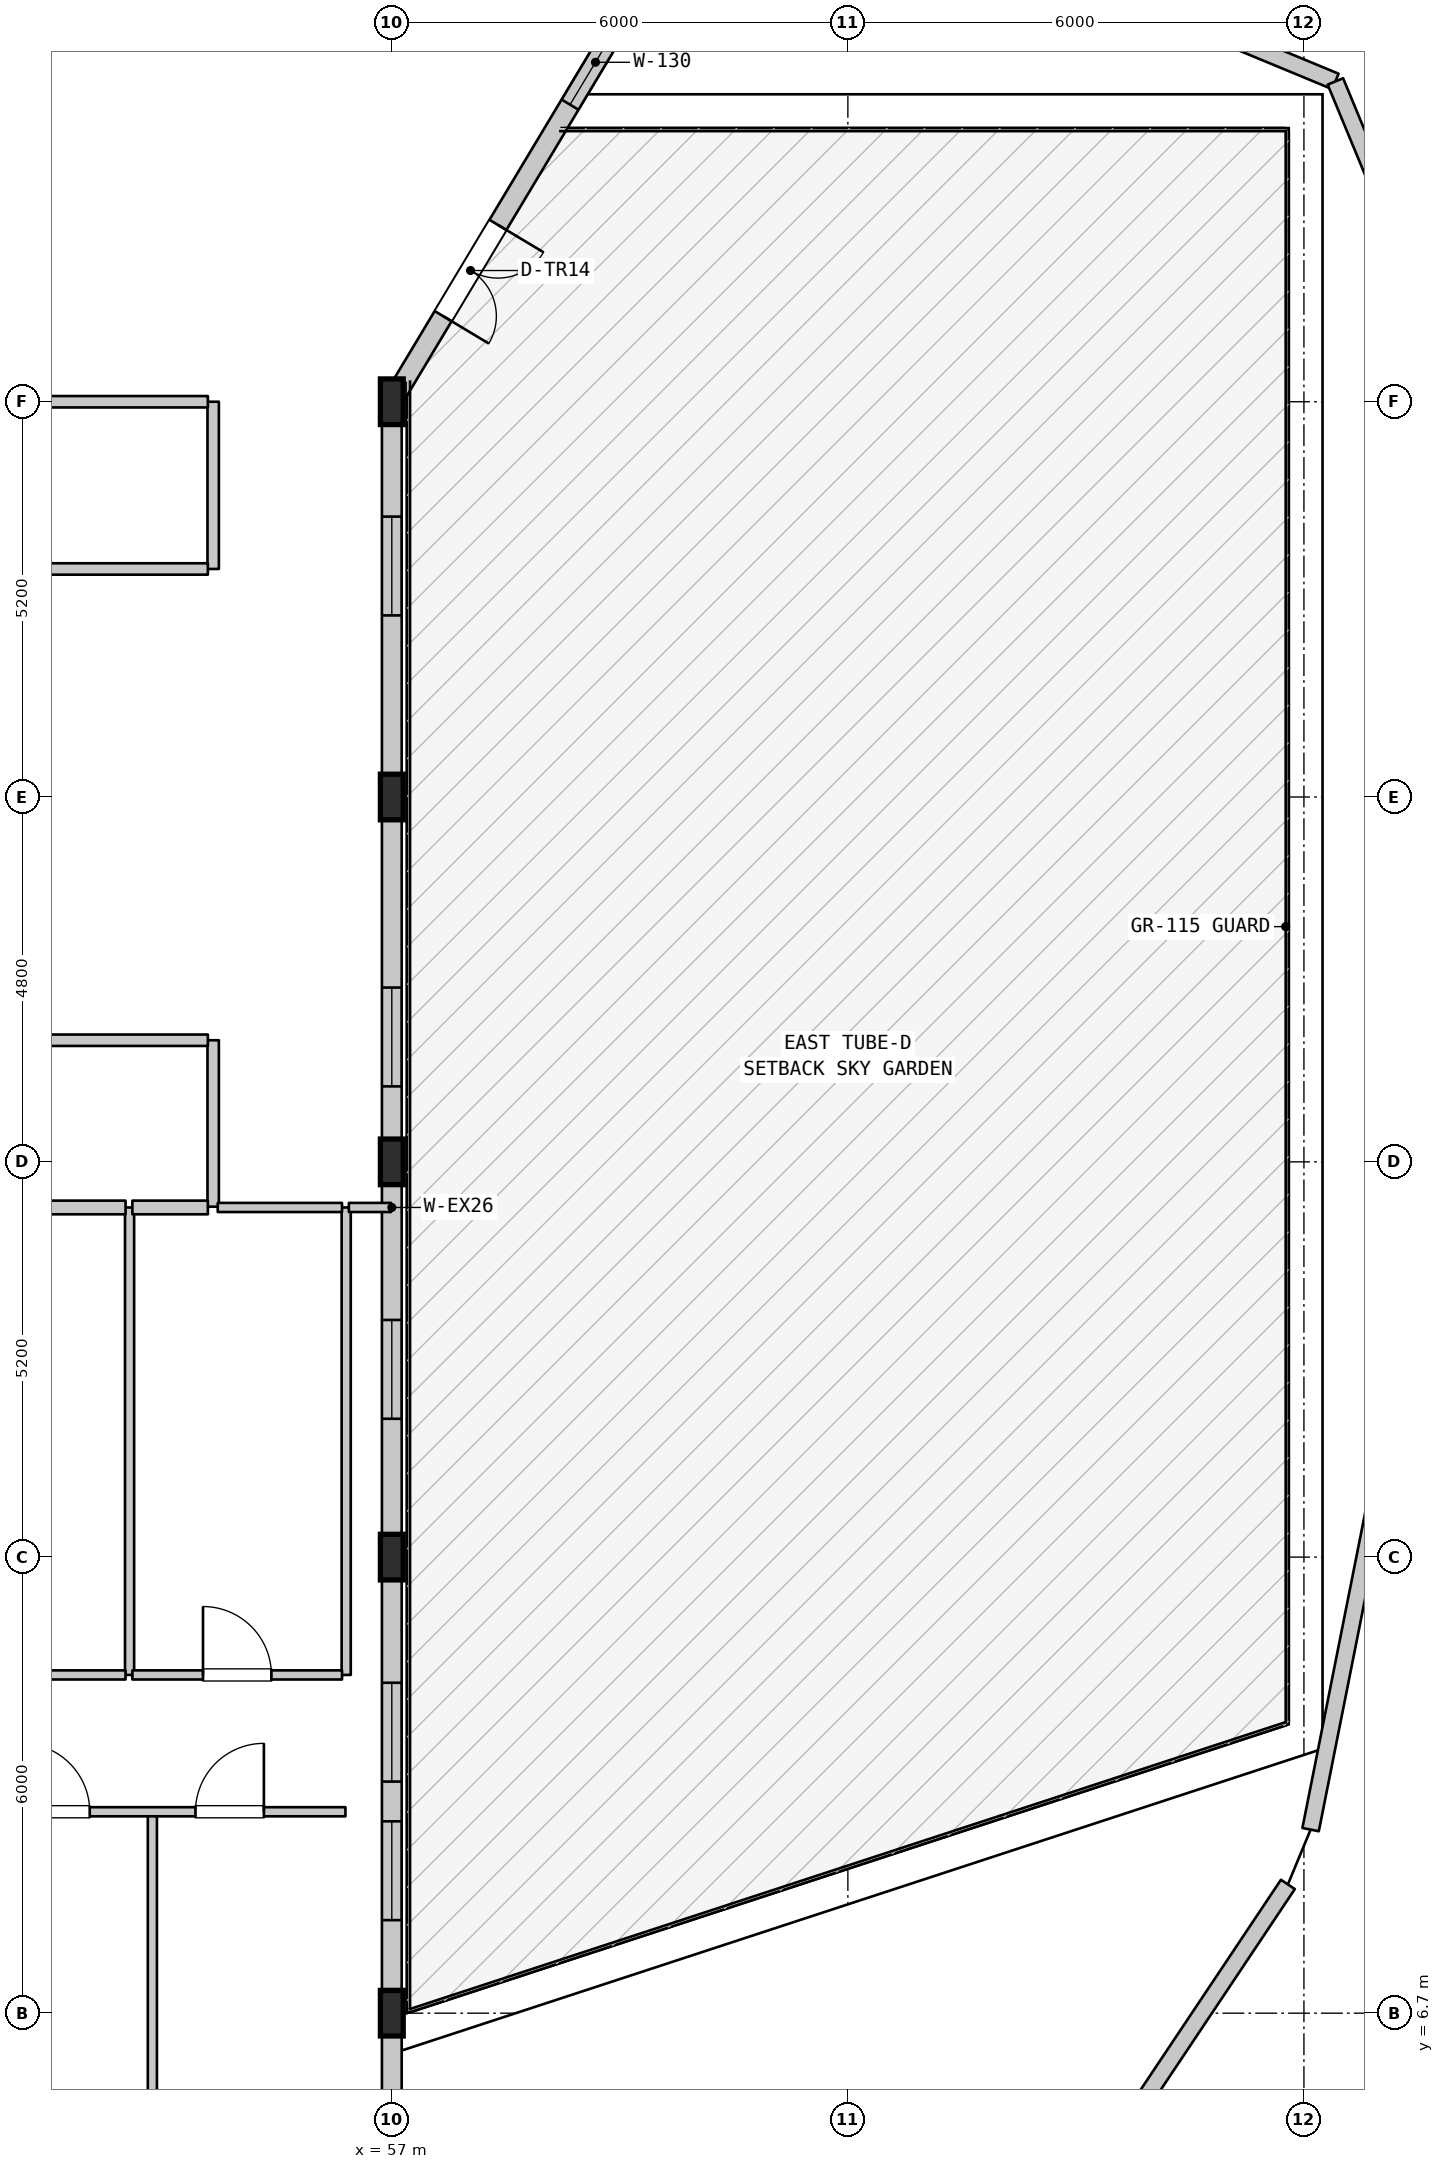
"""IFC4 building model, lengths in metres.
Left out: names, types, materials, properties, quantities, classifications, styles, units other than length and angle.
Written with IfcOpenShell. Run it as: python <this file> out.ifc"""

import sys

from ifc_helpers import new_model, si_unit, direction, frame, frame_2d, origin, origin_2d, place, context, subcontext, project, spatial, rectangle, i_section, extrude, element, fill, save


model = new_model("IFC4")
c1 = context("Model", 3, precision=1e-05, world=origin(), true_north=direction((0.0, 1.0)))
c2 = subcontext(c1, "Body", "Model", "MODEL_VIEW")
j1 = project(units=[si_unit("LENGTHUNIT", "METRE"), si_unit("PLANEANGLEUNIT", "RADIAN")], contexts=[c1])
p1 = place(None, origin())
s1 = spatial("IfcSite", under=j1, at=p1, CompositionType="ELEMENT")
p2 = place(p1, origin())
s2 = spatial("IfcBuilding", under=s1, at=p2, CompositionType="ELEMENT")
p3 = place(p2, frame((0.0, 0.0, 86.4)))
s3 = spatial("IfcBuildingStorey", under=s2, at=p3, CompositionType="ELEMENT", Elevation=86.4)
for number, where, z_axis, x_axis in (
    (1, (57.0, 6.7, 0.0), (0.0, 0.0, 1.0), (1.0, 0.0, 0.0)),
    (2, (57.0, 12.7, 0.0), (0.0, 0.0, 1.0), (1.0, 0.0, 0.0)),
    (3, (57.0, 17.9, 0.0), (0.0, 0.0, 1.0), (1.0, 0.0, 0.0)),
    (4, (57.0, 22.7, 0.0), (0.0, 0.0, 1.0), (1.0, 0.0, 0.0)),
    (5, (57.0, 27.9, 0.0), (0.0, 0.0, 1.0), (1.0, 0.0, 0.0)),
):
    element("IfcColumn", number, at=place(p3, frame(where, z_axis=z_axis, x_axis=x_axis)), inside=s3, PredefinedType="COLUMN", context=c2, shape_type="SweptSolid", body=[
        extrude(i_section(OverallWidth=0.3, OverallDepth=0.6, WebThickness=0.015, FlangeThickness=0.03, FilletRadius=0.027, at=origin_2d()), origin(), (0.0, 0.0, 1.0), 4.5),
    ])
p4 = place(p3, frame((62.308, 36.747, 0.0), z_axis=(0.0, 0.0, 1.0), x_axis=(-0.514481835924, -0.857501277261, 0.0)))
e6 = element("IfcWall", 6, at=p4, inside=s3, PredefinedType="STANDARD", context=c2, shape_type="SweptSolid", body=[
    extrude(rectangle(XDim=10.317, YDim=0.26, at=frame_2d((5.159, 0.0))), origin(), (0.0, 0.0, 1.0), 4.185),
])
p5 = place(p4, frame((7.604, 0.0, 0.0)))
e7 = element("IfcOpeningElement", 7, at=p5, cuts=e6, PredefinedType="OPENING", context=c2, shape_type="SweptSolid", body=[
    extrude(rectangle(XDim=1.4, YDim=2.2, at=frame_2d((0.7, 1.1))), frame((0.0, 0.14, 0.0), z_axis=(0.0, -1.0, 0.0), x_axis=(1.0, 0.0, 0.0)), (0.0, 0.0, 1.0), 0.28),
])
p6 = place(p4, frame((1.286, 0.0, 0.9)))
e8 = element("IfcOpeningElement", 8, at=p6, cuts=e6, PredefinedType="OPENING", context=c2, shape_type="SweptSolid", body=[
    extrude(rectangle(XDim=1.4, YDim=1.85, at=frame_2d((0.7, 0.925))), frame((0.0, 0.14, 0.0), z_axis=(0.0, -1.0, 0.0), x_axis=(1.0, 0.0, 0.0)), (0.0, 0.0, 1.0), 0.28),
])
p7 = place(p4, frame((4.459, 0.0, 0.9)))
e9 = element("IfcOpeningElement", 9, at=p7, cuts=e6, PredefinedType="OPENING", context=c2, shape_type="SweptSolid", body=[
    extrude(rectangle(XDim=1.3, YDim=1.9, at=frame_2d((0.65, 0.95))), frame((0.0, 0.14, 0.0), z_axis=(0.0, -1.0, 0.0), x_axis=(1.0, 0.0, 0.0)), (0.0, 0.0, 1.0), 0.28),
])
p8 = place(p3, frame((57.0, 27.9, 0.0), z_axis=(0.0, 0.0, 1.0), x_axis=(0.0, -1.0, 0.0)))
e10 = element("IfcWall", 10, at=p8, inside=s3, PredefinedType="STANDARD", context=c2, shape_type="SweptSolid", body=[
    extrude(rectangle(XDim=21.2, YDim=0.26, at=frame_2d((10.6, 0.0))), origin(), (0.0, 0.0, 1.0), 3.735),
])
p9 = place(p8, frame((1.511, 0.0, 0.85)))
e11 = element("IfcOpeningElement", 11, at=p9, cuts=e10, PredefinedType="OPENING", context=c2, shape_type="SweptSolid", body=[
    extrude(rectangle(XDim=1.3, YDim=1.9, at=frame_2d((0.65, 0.95))), frame((0.0, 0.14, 0.0), z_axis=(0.0, -1.0, 0.0), x_axis=(1.0, 0.0, 0.0)), (0.0, 0.0, 1.0), 0.28),
])
p10 = place(p8, frame((7.707, 0.0, 0.85)))
e12 = element("IfcOpeningElement", 12, at=p10, cuts=e10, PredefinedType="OPENING", context=c2, shape_type="SweptSolid", body=[
    extrude(rectangle(XDim=1.3, YDim=1.9, at=frame_2d((0.65, 0.95))), frame((0.0, 0.14, 0.0), z_axis=(0.0, -1.0, 0.0), x_axis=(1.0, 0.0, 0.0)), (0.0, 0.0, 1.0), 0.28),
])
p11 = place(p8, frame((12.08, 0.0, 0.85)))
e13 = element("IfcOpeningElement", 13, at=p11, cuts=e10, PredefinedType="OPENING", context=c2, shape_type="SweptSolid", body=[
    extrude(rectangle(XDim=1.3, YDim=1.9, at=frame_2d((0.65, 0.95))), frame((0.0, 0.14, 0.0), z_axis=(0.0, -1.0, 0.0), x_axis=(1.0, 0.0, 0.0)), (0.0, 0.0, 1.0), 0.28),
])
p12 = place(p8, frame((16.853, 0.0, 0.85)))
e14 = element("IfcOpeningElement", 14, at=p12, cuts=e10, PredefinedType="OPENING", context=c2, shape_type="SweptSolid", body=[
    extrude(rectangle(XDim=1.3, YDim=1.9, at=frame_2d((0.65, 0.95))), frame((0.0, 0.14, 0.0), z_axis=(0.0, -1.0, 0.0), x_axis=(1.0, 0.0, 0.0)), (0.0, 0.0, 1.0), 0.28),
])
p13 = place(p8, frame((18.676, 0.0, 0.85)))
e15 = element("IfcOpeningElement", 15, at=p13, cuts=e10, PredefinedType="OPENING", context=c2, shape_type="SweptSolid", body=[
    extrude(rectangle(XDim=1.3, YDim=1.9, at=frame_2d((0.65, 0.95))), frame((0.0, 0.14, 0.0), z_axis=(0.0, -1.0, 0.0), x_axis=(1.0, 0.0, 0.0)), (0.0, 0.0, 1.0), 0.28),
])
for number, where, z_axis, x_axis in (
    (16, (68.0, 32.7, 0.0), (0.0, 0.0, 1.0), (0.924, -0.383, 0.0)),
    (17, (69.414, 32.114, 0.0), (0.0, 0.0, 1.0), (0.383, -0.924, 0.0)),
):
    element("IfcWall", number, at=place(p3, frame(where, z_axis=z_axis, x_axis=x_axis)), inside=s3, PredefinedType="PARAPET", context=c2, shape_type="SweptSolid", body=[
        extrude(rectangle(XDim=1.531, YDim=0.22, at=frame_2d((0.765, 0.0))), origin(), (0.0, 0.0, 1.0), 0.55),
    ])
p14 = place(p3, frame((69.962, 13.507, 0.0), z_axis=(0.0, 0.0, 1.0), x_axis=(-0.195172473082, -0.980768935963, 0.0)))
e18 = element("IfcWall", 18, at=p14, inside=s3, PredefinedType="PARAPET", context=c2, shape_type="SweptSolid", body=[
    extrude(rectangle(XDim=4.478, YDim=0.22, at=frame_2d((2.239, 0.0))), origin(), (0.0, 0.0, 1.0), 0.55),
])
p15 = place(p3, frame((68.789, 8.394, 0.0), z_axis=(0.0, 0.0, 1.0), x_axis=(-0.555543000532, -0.831487807824, 0.0)))
e19 = element("IfcWall", 19, at=p15, inside=s3, PredefinedType="PARAPET", context=c2, shape_type="SweptSolid", body=[
    extrude(rectangle(XDim=4.277, YDim=0.22, at=frame_2d((2.138, 0.0))), origin(), (0.0, 0.0, 1.0), 0.55),
])
p16 = place(p3, frame((53.55, 11.15, 0.0), z_axis=(0.0, 0.0, 1.0), x_axis=(0.0, 1.0, 0.0)))
e20 = element("IfcWall", 20, at=p16, inside=s3, PredefinedType="PARTITIONING", context=c2, shape_type="SweptSolid", body=[
    extrude(rectangle(XDim=6.15, YDim=0.12, at=frame_2d((3.075, 0.0))), origin(), (0.0, 0.0, 1.0), 4.185),
])
p17 = place(p3, frame((53.85, 0.71, 0.0), z_axis=(0.0, 0.0, 1.0), x_axis=(0.0, 1.0, 0.0)))
e21 = element("IfcWall", 21, at=p17, inside=s3, PredefinedType="PARTITIONING", context=c2, shape_type="SweptSolid", body=[
    extrude(rectangle(XDim=8.64, YDim=0.12, at=frame_2d((4.32, 0.0))), origin(), (0.0, 0.0, 1.0), 4.185),
])
p18 = place(p3, frame((54.65, 17.31, 0.0), z_axis=(0.0, 0.0, 1.0), x_axis=(0.0, 1.0, 0.0)))
e22 = element("IfcWall", 22, at=p18, inside=s3, PredefinedType="STANDARD", context=c2, shape_type="SweptSolid", body=[
    extrude(rectangle(XDim=2.19, YDim=0.15, at=frame_2d((1.095, 0.0))), origin(), (0.0, 0.0, 1.0), 4.185),
])
p19 = place(p3, frame((54.65, 25.7, 0.0), z_axis=(0.0, 0.0, 1.0), x_axis=(0.0, 1.0, 0.0)))
e23 = element("IfcWall", 23, at=p19, inside=s3, PredefinedType="STANDARD", context=c2, shape_type="SweptSolid", body=[
    extrude(rectangle(XDim=2.2, YDim=0.15, at=frame_2d((1.1, 0.0))), origin(), (0.0, 0.0, 1.0), 4.185),
])
p20 = place(p3, frame((56.4, 11.15, 0.0), z_axis=(0.0, 0.0, 1.0), x_axis=(0.0, 1.0, 0.0)))
e24 = element("IfcWall", 24, at=p20, inside=s3, PredefinedType="PARTITIONING", context=c2, shape_type="SweptSolid", body=[
    extrude(rectangle(XDim=6.15, YDim=0.12, at=frame_2d((3.075, 0.0))), origin(), (0.0, 0.0, 1.0), 4.185),
])
p21 = place(p3, frame((46.265, 9.35, 0.0), z_axis=(0.0, 0.0, 1.0), x_axis=(1.0, 0.0, 0.0)))
e25 = element("IfcWall", 25, at=p21, inside=s3, PredefinedType="PARTITIONING", context=c2, shape_type="SweptSolid", body=[
    extrude(rectangle(XDim=10.125, YDim=0.12, at=frame_2d((5.062, 0.0))), origin(), (0.0, 0.0, 1.0), 4.185),
])
p22 = place(p21, frame((0.875, 0.0, 0.0)))
e26 = element("IfcOpeningElement", 26, at=p22, cuts=e25, PredefinedType="OPENING", context=c2, shape_type="SweptSolid", body=[
    extrude(rectangle(XDim=0.9, YDim=2.15, at=frame_2d((0.45, 1.075))), frame((0.0, 0.07, 0.0), z_axis=(0.0, -1.0, 0.0), x_axis=(1.0, 0.0, 0.0)), (0.0, 0.0, 1.0), 0.14),
])
p23 = place(p21, frame((3.319, 0.0, 0.0)))
e27 = element("IfcOpeningElement", 27, at=p23, cuts=e25, PredefinedType="OPENING", context=c2, shape_type="SweptSolid", body=[
    extrude(rectangle(XDim=0.9, YDim=2.15, at=frame_2d((0.45, 1.075))), frame((0.0, 0.07, 0.0), z_axis=(0.0, -1.0, 0.0), x_axis=(1.0, 0.0, 0.0)), (0.0, 0.0, 1.0), 0.14),
])
p24 = place(p21, frame((5.861, 0.0, 0.0)))
e28 = element("IfcOpeningElement", 28, at=p24, cuts=e25, PredefinedType="OPENING", context=c2, shape_type="SweptSolid", body=[
    extrude(rectangle(XDim=0.9, YDim=2.15, at=frame_2d((0.45, 1.075))), frame((0.0, 0.07, 0.0), z_axis=(0.0, -1.0, 0.0), x_axis=(1.0, 0.0, 0.0)), (0.0, 0.0, 1.0), 0.14),
])
p25 = place(p21, frame((8.152, 0.0, 0.0)))
e29 = element("IfcOpeningElement", 29, at=p25, cuts=e25, PredefinedType="OPENING", context=c2, shape_type="SweptSolid", body=[
    extrude(rectangle(XDim=0.9, YDim=2.15, at=frame_2d((0.45, 1.075))), frame((0.0, 0.07, 0.0), z_axis=(0.0, -1.0, 0.0), x_axis=(1.0, 0.0, 0.0)), (0.0, 0.0, 1.0), 0.14),
])
p26 = place(p3, frame((49.849, 11.15, 0.0), z_axis=(0.0, 0.0, 1.0), x_axis=(1.0, 0.0, 0.0)))
e30 = element("IfcWall", 30, at=p26, inside=s3, PredefinedType="PARTITIONING", context=c2, shape_type="SweptSolid", body=[
    extrude(rectangle(XDim=3.648, YDim=0.12, at=frame_2d((1.824, 0.0))), origin(), (0.0, 0.0, 1.0), 4.185),
])
p27 = place(p26, frame((1.271, 0.0, 0.0)))
e31 = element("IfcOpeningElement", 31, at=p27, cuts=e30, PredefinedType="OPENING", context=c2, shape_type="SweptSolid", body=[
    extrude(rectangle(XDim=0.9, YDim=2.15, at=frame_2d((0.45, 1.075))), frame((0.0, 0.07, 0.0), z_axis=(0.0, -1.0, 0.0), x_axis=(1.0, 0.0, 0.0)), (0.0, 0.0, 1.0), 0.14),
])
p28 = place(p3, frame((53.587, 11.15, 0.0), z_axis=(0.0, 0.0, 1.0), x_axis=(1.0, 0.0, 0.0)))
e32 = element("IfcWall", 32, at=p28, inside=s3, PredefinedType="PARTITIONING", context=c2, shape_type="SweptSolid", body=[
    extrude(rectangle(XDim=2.758, YDim=0.12, at=frame_2d((1.379, 0.0))), origin(), (0.0, 0.0, 1.0), 4.185),
])
p29 = place(p28, frame((0.929, 0.0, 0.0)))
e33 = element("IfcOpeningElement", 33, at=p29, cuts=e32, PredefinedType="OPENING", context=c2, shape_type="SweptSolid", body=[
    extrude(rectangle(XDim=0.9, YDim=2.1, at=frame_2d((0.45, 1.05))), frame((0.0, 0.07, 0.0), z_axis=(0.0, -1.0, 0.0), x_axis=(1.0, 0.0, 0.0)), (0.0, 0.0, 1.0), 0.14),
])
p30 = place(p3, frame((49.849, 17.3, 0.0), z_axis=(0.0, 0.0, 1.0), x_axis=(1.0, 0.0, 0.0)))
e34 = element("IfcWall", 34, at=p30, inside=s3, PredefinedType="STANDARD", context=c2, shape_type="SweptSolid", body=[
    extrude(rectangle(XDim=3.648, YDim=0.18, at=frame_2d((1.824, 0.0))), origin(), (0.0, 0.0, 1.0), 4.185),
])
p31 = place(p3, frame((53.587, 17.3, 0.0), z_axis=(0.0, 0.0, 1.0), x_axis=(1.0, 0.0, 0.0)))
e35 = element("IfcWall", 35, at=p31, inside=s3, PredefinedType="STANDARD", context=c2, shape_type="SweptSolid", body=[
    extrude(rectangle(XDim=0.993, YDim=0.18, at=frame_2d((0.497, 0.0))), origin(), (0.0, 0.0, 1.0), 4.185),
])
p32 = place(p3, frame((54.71, 17.3, 0.0), z_axis=(0.0, 0.0, 1.0), x_axis=(1.0, 0.0, 0.0)))
e36 = element("IfcWall", 36, at=p32, inside=s3, PredefinedType="PARTITIONING", context=c2, shape_type="SweptSolid", body=[
    extrude(rectangle(XDim=1.635, YDim=0.12, at=frame_2d((0.817, 0.0))), origin(), (0.0, 0.0, 1.0), 4.185),
])
p33 = place(p3, frame((56.435, 17.3, 0.0), z_axis=(0.0, 0.0, 1.0), x_axis=(1.0, 0.0, 0.0)))
e37 = element("IfcWall", 37, at=p33, inside=s3, PredefinedType="PARTITIONING", context=c2, shape_type="SweptSolid", body=[
    extrude(rectangle(XDim=0.555, YDim=0.12, at=frame_2d((0.277, 0.0))), origin(), (0.0, 0.0, 1.0), 4.185),
])
for number, where, z_axis, x_axis in (
    (38, (33.07, 19.5, 0.0), (0.0, 0.0, 1.0), (1.0, 0.0, 0.0)),
    (39, (33.07, 25.7, 0.0), (0.0, 0.0, 1.0), (1.0, 0.0, 0.0)),
):
    element("IfcWall", number, at=place(p3, frame(where, z_axis=z_axis, x_axis=x_axis)), inside=s3, PredefinedType="STANDARD", context=c2, shape_type="SweptSolid", body=[
        extrude(rectangle(XDim=21.51, YDim=0.15, at=frame_2d((10.755, 0.0))), origin(), (0.0, 0.0, 1.0), 4.185),
    ])
p34 = place(p3, frame((57.0, 6.7, 0.0), z_axis=(0.0, 0.0, 1.0), x_axis=(0.0, -1.0, 0.0)))
e40 = element("IfcWall", 40, at=p34, inside=s3, PredefinedType="STANDARD", context=c2, shape_type="SweptSolid", body=[
    extrude(rectangle(XDim=4.0, YDim=0.26, at=frame_2d((2.0, 0.0))), origin(), (0.0, 0.0, 1.0), 4.185),
])
p35 = place(p34, frame((1.449, 0.0, 0.85)))
e41 = element("IfcOpeningElement", 41, at=p35, cuts=e40, PredefinedType="OPENING", context=c2, shape_type="SweptSolid", body=[
    extrude(rectangle(XDim=1.3, YDim=1.9, at=frame_2d((0.65, 0.95))), frame((0.0, 0.14, 0.0), z_axis=(0.0, -1.0, 0.0), x_axis=(1.0, 0.0, 0.0)), (0.0, 0.0, 1.0), 0.28),
])
p36 = place(p3, frame((45.0, 27.9, 0.0), z_axis=(0.0, 0.0, 1.0), x_axis=(1.0, 0.0, 0.0)))
e42 = element("IfcWall", 42, at=p36, inside=s3, PredefinedType="STANDARD", context=c2, shape_type="SweptSolid", body=[
    extrude(rectangle(XDim=9.58, YDim=0.15, at=frame_2d((4.79, 0.0))), origin(), (0.0, 0.0, 1.0), 3.735),
])
p37 = place(p5, origin())
e43 = element("IfcDoor", 43, at=p37, inside=s3, OperationType="DOUBLE_DOOR_SINGLE_SWING", PredefinedType="DOOR", context=c2, shape_type="SweptSolid", body=[
    extrude(rectangle(XDim=1.4, YDim=2.2, at=frame_2d((0.7, 1.1))), frame((0.0, 0.025, 0.0), z_axis=(0.0, -1.0, 0.0), x_axis=(1.0, 0.0, 0.0)), (0.0, 0.0, 1.0), 0.05),
])
fill(e7, e43)
p38 = place(p7, origin())
e44 = element("IfcWindow", 44, at=p38, inside=s3, PartitioningType="SINGLE_PANEL", PredefinedType="WINDOW", context=c2, shape_type="SweptSolid", body=[
    extrude(rectangle(XDim=1.3, YDim=1.9, at=frame_2d((0.65, 0.95))), frame((0.0, 0.03, 0.0), z_axis=(0.0, -1.0, 0.0), x_axis=(1.0, 0.0, 0.0)), (0.0, 0.0, 1.0), 0.06),
])
fill(e9, e44)
p39 = place(p9, origin())
e45 = element("IfcWindow", 45, at=p39, inside=s3, PartitioningType="SINGLE_PANEL", PredefinedType="WINDOW", context=c2, shape_type="SweptSolid", body=[
    extrude(rectangle(XDim=1.3, YDim=1.9, at=frame_2d((0.65, 0.95))), frame((0.0, 0.03, 0.0), z_axis=(0.0, -1.0, 0.0), x_axis=(1.0, 0.0, 0.0)), (0.0, 0.0, 1.0), 0.06),
])
fill(e11, e45)
p40 = place(p10, origin())
e46 = element("IfcWindow", 46, at=p40, inside=s3, PartitioningType="SINGLE_PANEL", PredefinedType="WINDOW", context=c2, shape_type="SweptSolid", body=[
    extrude(rectangle(XDim=1.3, YDim=1.9, at=frame_2d((0.65, 0.95))), frame((0.0, 0.03, 0.0), z_axis=(0.0, -1.0, 0.0), x_axis=(1.0, 0.0, 0.0)), (0.0, 0.0, 1.0), 0.06),
])
fill(e12, e46)
p41 = place(p11, origin())
e47 = element("IfcWindow", 47, at=p41, inside=s3, PartitioningType="SINGLE_PANEL", PredefinedType="WINDOW", context=c2, shape_type="SweptSolid", body=[
    extrude(rectangle(XDim=1.3, YDim=1.9, at=frame_2d((0.65, 0.95))), frame((0.0, 0.03, 0.0), z_axis=(0.0, -1.0, 0.0), x_axis=(1.0, 0.0, 0.0)), (0.0, 0.0, 1.0), 0.06),
])
fill(e13, e47)
p42 = place(p12, origin())
e48 = element("IfcWindow", 48, at=p42, inside=s3, PartitioningType="SINGLE_PANEL", PredefinedType="WINDOW", context=c2, shape_type="SweptSolid", body=[
    extrude(rectangle(XDim=1.3, YDim=1.9, at=frame_2d((0.65, 0.95))), frame((0.0, 0.03, 0.0), z_axis=(0.0, -1.0, 0.0), x_axis=(1.0, 0.0, 0.0)), (0.0, 0.0, 1.0), 0.06),
])
fill(e14, e48)
p43 = place(p13, origin())
e49 = element("IfcWindow", 49, at=p43, inside=s3, PartitioningType="SINGLE_PANEL", PredefinedType="WINDOW", context=c2, shape_type="SweptSolid", body=[
    extrude(rectangle(XDim=1.3, YDim=1.9, at=frame_2d((0.65, 0.95))), frame((0.0, 0.03, 0.0), z_axis=(0.0, -1.0, 0.0), x_axis=(1.0, 0.0, 0.0)), (0.0, 0.0, 1.0), 0.06),
])
fill(e15, e49)
p44 = place(p24, origin())
e50 = element("IfcDoor", 50, at=p44, inside=s3, OperationType="SINGLE_SWING_LEFT", PredefinedType="DOOR", context=c2, shape_type="SweptSolid", body=[
    extrude(rectangle(XDim=0.9, YDim=2.15, at=frame_2d((0.45, 1.075))), frame((0.0, 0.025, 0.0), z_axis=(0.0, -1.0, 0.0), x_axis=(1.0, 0.0, 0.0)), (0.0, 0.0, 1.0), 0.05),
])
fill(e28, e50)
p45 = place(p25, origin())
e51 = element("IfcDoor", 51, at=p45, inside=s3, OperationType="SINGLE_SWING_RIGHT", PredefinedType="DOOR", context=c2, shape_type="SweptSolid", body=[
    extrude(rectangle(XDim=0.9, YDim=2.15, at=frame_2d((0.45, 1.075))), frame((0.0, 0.025, 0.0), z_axis=(0.0, -1.0, 0.0), x_axis=(1.0, 0.0, 0.0)), (0.0, 0.0, 1.0), 0.05),
])
fill(e29, e51)
p46 = place(p29, origin())
e52 = element("IfcDoor", 52, at=p46, inside=s3, OperationType="SINGLE_SWING_LEFT", PredefinedType="DOOR", context=c2, shape_type="SweptSolid", body=[
    extrude(rectangle(XDim=0.9, YDim=2.1, at=frame_2d((0.45, 1.05))), frame((0.0, 0.025, 0.0), z_axis=(0.0, -1.0, 0.0), x_axis=(1.0, 0.0, 0.0)), (0.0, 0.0, 1.0), 0.05),
])
fill(e33, e52)
save(model, sys.argv[1])
